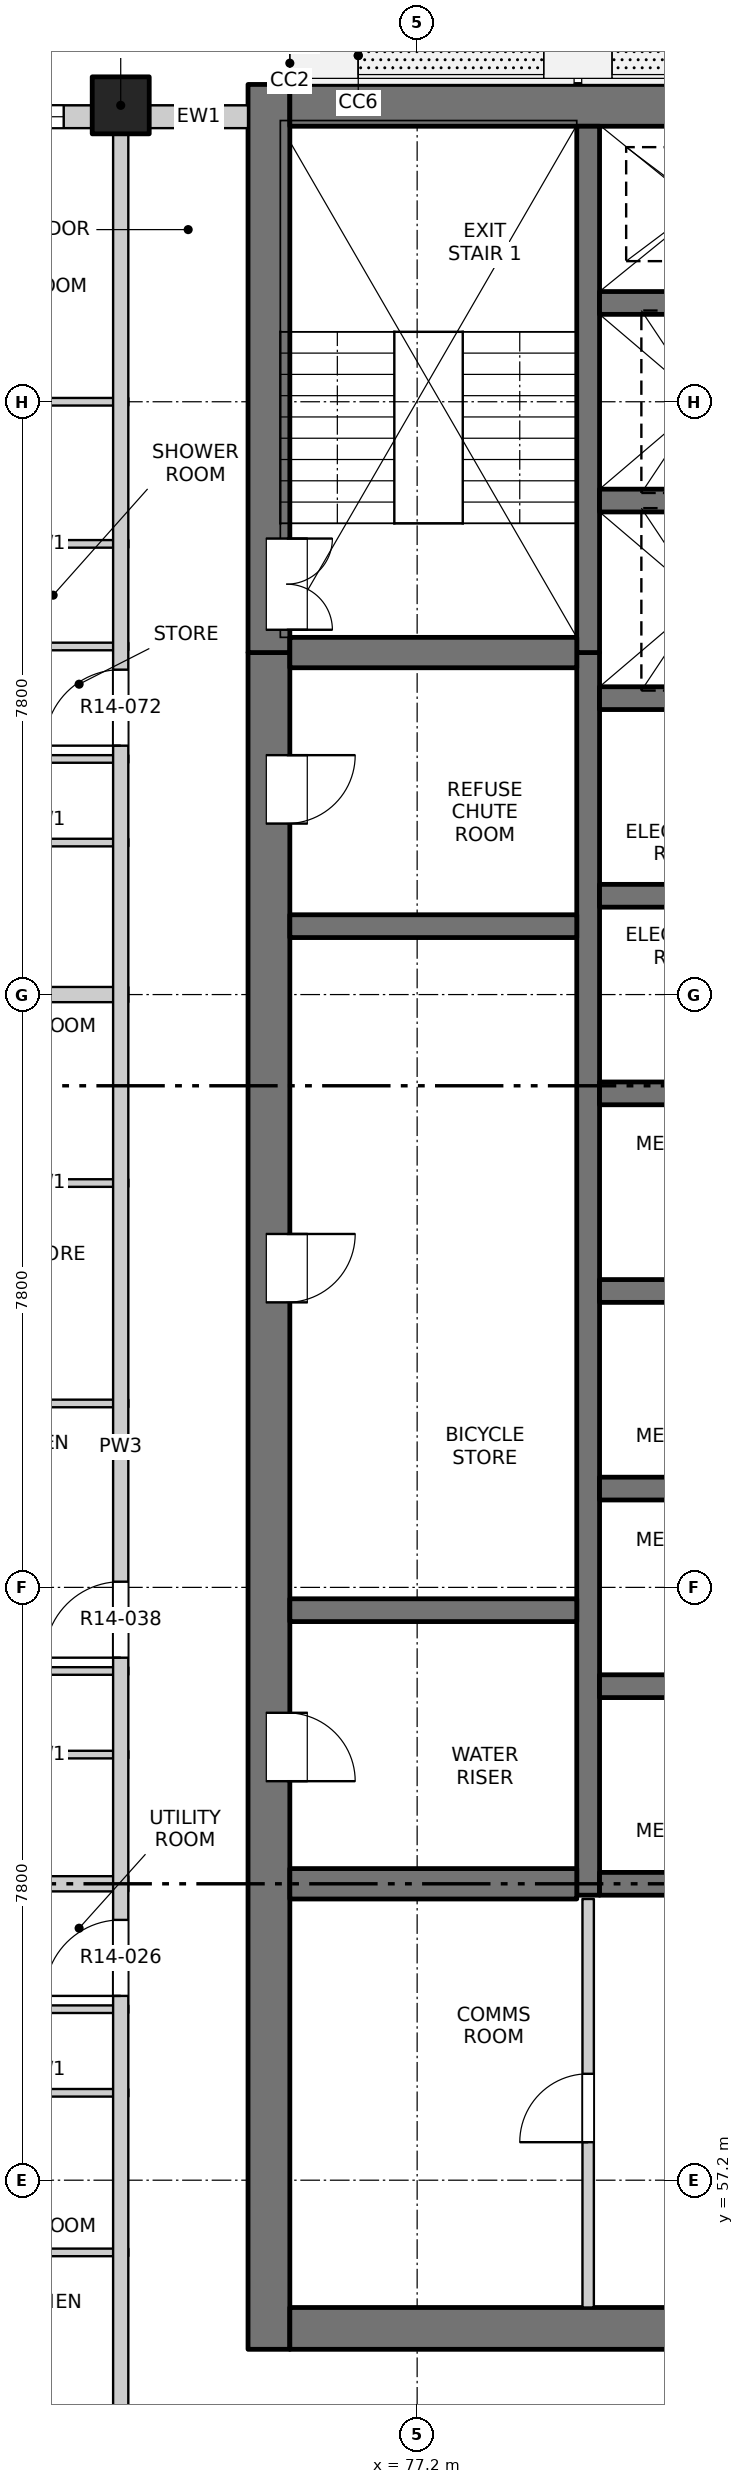
"""IFC4 building model, lengths in metres.
Left out: names, types, materials, properties, quantities, classifications, styles, units other than length and angle.
Written with IfcOpenShell. Run it as: python <this file> out.ifc"""

import sys

from ifc_helpers import new_model, si_unit, direction, frame, frame_2d, origin, origin_2d, place, context, subcontext, project, spatial, rectangle, extrude, element, fill, save


model = new_model("IFC4")
c1 = context("Model", 3, precision=1e-05, world=origin(), true_north=direction((0.0, 1.0)))
c2 = subcontext(c1, "Body", "Model", "MODEL_VIEW")
j1 = project(units=[si_unit("LENGTHUNIT", "METRE"), si_unit("PLANEANGLEUNIT", "RADIAN")], contexts=[c1])
p1 = place(None, origin())
s1 = spatial("IfcSite", under=j1, at=p1, CompositionType="ELEMENT")
p2 = place(p1, origin())
s2 = spatial("IfcBuilding", under=s1, at=p2, CompositionType="ELEMENT")
p3 = place(p2, frame((0.0, 0.0, 155.4)))
s3 = spatial("IfcBuildingStorey", under=s2, at=p3, CompositionType="ELEMENT", Elevation=155.4)
p4 = place(p3, frame((73.3, 84.5, -0.25), z_axis=(0.0, 0.0, 1.0), x_axis=(1.0, 0.0, 0.0)))
e1 = element("IfcColumn", 1, at=p4, inside=s3, PredefinedType="COLUMN", context=c2, shape_type="SweptSolid", body=[
    extrude(rectangle(XDim=0.75, YDim=0.75, at=origin_2d()), origin(), (0.0, 0.0, 1.0), 3.4),
])
p5 = place(p3, frame((75.25, 54.975, -0.25), z_axis=(0.0, 0.0, 1.0), x_axis=(0.0, 1.0, 0.0)))
e2 = element("IfcWall", 2, at=p5, inside=s3, PredefinedType="SOLIDWALL", context=c2, shape_type="SweptSolid", body=[
    extrude(rectangle(XDim=22.325, YDim=0.55, at=frame_2d((11.163, 0.0))), origin(), (0.0, 0.0, 1.0), 3.4),
])
p6 = place(p5, frame((7.475, 0.0, 0.25)))
e3 = element("IfcOpeningElement", 3, at=p6, cuts=e2, PredefinedType="OPENING", context=c2, shape_type="SweptSolid", body=[
    extrude(rectangle(XDim=0.9, YDim=2.1, at=frame_2d((0.45, 1.05))), frame((0.0, 0.285, 0.0), z_axis=(0.0, -1.0, 0.0), x_axis=(1.0, 0.0, 0.0)), (0.0, 0.0, 1.0), 0.57),
])
p7 = place(p5, frame((13.775, 0.0, 0.25)))
e4 = element("IfcOpeningElement", 4, at=p7, cuts=e2, PredefinedType="OPENING", context=c2, shape_type="SweptSolid", body=[
    extrude(rectangle(XDim=0.9, YDim=2.1, at=frame_2d((0.45, 1.05))), frame((0.0, 0.285, 0.0), z_axis=(0.0, -1.0, 0.0), x_axis=(1.0, 0.0, 0.0)), (0.0, 0.0, 1.0), 0.57),
])
p8 = place(p5, frame((20.075, 0.0, 0.25)))
e5 = element("IfcOpeningElement", 5, at=p8, cuts=e2, PredefinedType="OPENING", context=c2, shape_type="SweptSolid", body=[
    extrude(rectangle(XDim=0.9, YDim=2.1, at=frame_2d((0.45, 1.05))), frame((0.0, 0.285, 0.0), z_axis=(0.0, -1.0, 0.0), x_axis=(1.0, 0.0, 0.0)), (0.0, 0.0, 1.0), 0.57),
])
p9 = place(p3, frame((75.25, 77.3, -0.25), z_axis=(0.0, 0.0, 1.0), x_axis=(0.0, 1.0, 0.0)))
e6 = element("IfcWall", 6, at=p9, inside=s3, PredefinedType="SOLIDWALL", context=c2, shape_type="SweptSolid", body=[
    extrude(rectangle(XDim=7.475, YDim=0.55, at=frame_2d((3.737, 0.0))), origin(), (0.0, 0.0, 1.0), 3.4),
])
p10 = place(p9, frame((0.3, 0.0, 0.25)))
e7 = element("IfcOpeningElement", 7, at=p10, cuts=e6, PredefinedType="OPENING", context=c2, shape_type="SweptSolid", body=[
    extrude(rectangle(XDim=1.2, YDim=2.1, at=frame_2d((0.6, 1.05))), frame((0.0, 0.285, 0.0), z_axis=(0.0, -1.0, 0.0), x_axis=(1.0, 0.0, 0.0)), (0.0, 0.0, 1.0), 0.57),
])
p11 = place(p3, frame((75.525, 55.25, -0.25), z_axis=(0.0, 0.0, 1.0), x_axis=(1.0, 0.0, 0.0)))
e8 = element("IfcWall", 8, at=p11, inside=s3, PredefinedType="SOLIDWALL", context=c2, shape_type="SweptSolid", body=[
    extrude(rectangle(XDim=18.95, YDim=0.55, at=frame_2d((9.475, 0.0))), origin(), (0.0, 0.0, 1.0), 3.4),
])
p12 = place(p11, frame((8.725, 0.0, 0.25)))
e9 = element("IfcOpeningElement", 9, at=p12, cuts=e8, PredefinedType="OPENING", context=c2, shape_type="SweptSolid", body=[
    extrude(rectangle(XDim=1.5, YDim=2.1, at=frame_2d((0.75, 1.05))), frame((0.0, 0.285, 0.0), z_axis=(0.0, -1.0, 0.0), x_axis=(1.0, 0.0, 0.0)), (0.0, 0.0, 1.0), 0.57),
])
p13 = place(p3, frame((75.525, 84.5, -0.25), z_axis=(0.0, 0.0, 1.0), x_axis=(1.0, 0.0, 0.0)))
e10 = element("IfcWall", 10, at=p13, inside=s3, PredefinedType="SOLIDWALL", context=c2, shape_type="SweptSolid", body=[
    extrude(rectangle(XDim=18.95, YDim=0.55, at=frame_2d((9.475, 0.0))), origin(), (0.0, 0.0, 1.0), 3.4),
])
p14 = place(p3, frame((79.45, 60.95, -0.25), z_axis=(0.0, 0.0, 1.0), x_axis=(0.0, 1.0, 0.0)))
e11 = element("IfcWall", 11, at=p14, inside=s3, PredefinedType="SOLIDWALL", context=c2, shape_type="SweptSolid", body=[
    extrude(rectangle(XDim=16.35, YDim=0.3, at=frame_2d((8.175, 0.0))), origin(), (0.0, 0.0, 1.0), 3.4),
])
p15 = place(p3, frame((79.45, 77.3, -0.25), z_axis=(0.0, 0.0, 1.0), x_axis=(0.0, 1.0, 0.0)))
e12 = element("IfcWall", 12, at=p15, inside=s3, PredefinedType="SOLIDWALL", context=c2, shape_type="SweptSolid", body=[
    extrude(rectangle(XDim=6.925, YDim=0.3, at=frame_2d((3.462, 0.0))), origin(), (0.0, 0.0, 1.0), 3.4),
])
for number, where, z_axis, x_axis in (
    (13, (79.6, 61.1, -0.25), (0.0, 0.0, 1.0), (1.0, 0.0, 0.0)),
    (14, (79.6, 63.7, -0.25), (0.0, 0.0, 1.0), (1.0, 0.0, 0.0)),
    (15, (79.6, 66.3, -0.25), (0.0, 0.0, 1.0), (1.0, 0.0, 0.0)),
    (16, (79.6, 68.9, -0.25), (0.0, 0.0, 1.0), (1.0, 0.0, 0.0)),
    (17, (79.6, 71.5, -0.25), (0.0, 0.0, 1.0), (1.0, 0.0, 0.0)),
    (18, (79.6, 74.1, -0.25), (0.0, 0.0, 1.0), (1.0, 0.0, 0.0)),
    (19, (79.6, 76.7, -0.25), (0.0, 0.0, 1.0), (1.0, 0.0, 0.0)),
    (20, (79.6, 79.3, -0.25), (0.0, 0.0, 1.0), (1.0, 0.0, 0.0)),
    (21, (79.6, 81.9, -0.25), (0.0, 0.0, 1.0), (1.0, 0.0, 0.0)),
):
    element("IfcWall", number, at=place(p3, frame(where, z_axis=z_axis, x_axis=x_axis)), inside=s3, PredefinedType="SOLIDWALL", context=c2, shape_type="SweptSolid", body=[
        extrude(rectangle(XDim=3.0, YDim=0.3, at=frame_2d((1.5, 0.0))), origin(), (0.0, 0.0, 1.0), 3.4),
    ])
p16 = place(p3, frame((75.525, 61.1, -0.25), z_axis=(0.0, 0.0, 1.0), x_axis=(1.0, 0.0, 0.0)))
e22 = element("IfcWall", 22, at=p16, inside=s3, PredefinedType="SOLIDWALL", context=c2, shape_type="SweptSolid", body=[
    extrude(rectangle(XDim=3.775, YDim=0.4, at=frame_2d((1.888, 0.0))), origin(), (0.0, 0.0, 1.0), 3.4),
])
for number, where, z_axis, x_axis in (
    (23, (75.525, 64.7, -0.25), (0.0, 0.0, 1.0), (1.0, 0.0, 0.0)),
    (24, (75.525, 73.7, -0.25), (0.0, 0.0, 1.0), (1.0, 0.0, 0.0)),
):
    element("IfcWall", number, at=place(p3, frame(where, z_axis=z_axis, x_axis=x_axis)), inside=s3, PredefinedType="SOLIDWALL", context=c2, shape_type="SweptSolid", body=[
        extrude(rectangle(XDim=3.775, YDim=0.3, at=frame_2d((1.888, 0.0))), origin(), (0.0, 0.0, 1.0), 3.4),
    ])
p17 = place(p3, frame((75.525, 77.3, -0.25), z_axis=(0.0, 0.0, 1.0), x_axis=(1.0, 0.0, 0.0)))
e25 = element("IfcWall", 25, at=p17, inside=s3, PredefinedType="SOLIDWALL", context=c2, shape_type="SweptSolid", body=[
    extrude(rectangle(XDim=3.775, YDim=0.4, at=frame_2d((1.888, 0.0))), origin(), (0.0, 0.0, 1.0), 3.4),
])
p18 = place(p3, frame((69.4, 84.35, 0.0), z_axis=(0.0, 0.0, 1.0), x_axis=(1.0, 0.0, 0.0)))
e26 = element("IfcWall", 26, at=p18, inside=s3, PredefinedType="SOLIDWALL", context=c2, shape_type="SweptSolid", body=[
    extrude(rectangle(XDim=3.525, YDim=0.3, at=frame_2d((1.763, 0.0))), origin(), (0.0, 0.0, 1.0), 2.7),
])
p19 = place(p18, frame((0.75, 0.0, 0.9)))
e27 = element("IfcOpeningElement", 27, at=p19, cuts=e26, PredefinedType="OPENING", context=c2, shape_type="SweptSolid", body=[
    extrude(rectangle(XDim=2.4, YDim=1.8, at=frame_2d((1.2, 0.9))), frame((0.0, 0.16, 0.0), z_axis=(0.0, -1.0, 0.0), x_axis=(1.0, 0.0, 0.0)), (0.0, 0.0, 1.0), 0.32),
])
p20 = place(p3, frame((73.675, 84.35, 0.0), z_axis=(0.0, 0.0, 1.0), x_axis=(1.0, 0.0, 0.0)))
e28 = element("IfcWall", 28, at=p20, inside=s3, PredefinedType="SOLIDWALL", context=c2, shape_type="SweptSolid", body=[
    extrude(rectangle(XDim=1.3, YDim=0.3, at=frame_2d((0.65, 0.0))), origin(), (0.0, 0.0, 1.0), 2.7),
])
for number, where, z_axis, x_axis in (
    (29, (71.18, 56.25, 0.0), (0.0, 0.0, 1.0), (1.0, 0.0, 0.0)),
    (30, (71.18, 58.35, 0.0), (0.0, 0.0, 1.0), (1.0, 0.0, 0.0)),
    (31, (71.18, 59.45, 0.0), (0.0, 0.0, 1.0), (1.0, 0.0, 0.0)),
):
    element("IfcWall", number, at=place(p3, frame(where, z_axis=z_axis, x_axis=x_axis)), inside=s3, PredefinedType="PARTITIONING", context=c2, shape_type="SweptSolid", body=[
        extrude(rectangle(XDim=2.22, YDim=0.1, at=frame_2d((1.11, 0.0))), origin(), (0.0, 0.0, 1.0), 3.15),
    ])
p21 = place(p3, frame((65.8, 61.1, 0.0), z_axis=(0.0, 0.0, 1.0), x_axis=(1.0, 0.0, 0.0)))
e32 = element("IfcWall", 32, at=p21, inside=s3, PredefinedType="PARTITIONING", context=c2, shape_type="SweptSolid", body=[
    extrude(rectangle(XDim=7.6, YDim=0.2, at=frame_2d((3.8, 0.0))), origin(), (0.0, 0.0, 1.0), 2.55),
])
for number, where, z_axis, x_axis in (
    (33, (71.18, 62.8, 0.0), (0.0, 0.0, 1.0), (1.0, 0.0, 0.0)),
    (34, (71.18, 63.9, 0.0), (0.0, 0.0, 1.0), (1.0, 0.0, 0.0)),
    (35, (71.18, 67.42, 0.0), (0.0, 0.0, 1.0), (1.0, 0.0, 0.0)),
    (36, (71.18, 70.32, 0.0), (0.0, 0.0, 1.0), (1.0, 0.0, 0.0)),
):
    element("IfcWall", number, at=place(p3, frame(where, z_axis=z_axis, x_axis=x_axis)), inside=s3, PredefinedType="PARTITIONING", context=c2, shape_type="SweptSolid", body=[
        extrude(rectangle(XDim=2.22, YDim=0.1, at=frame_2d((1.11, 0.0))), origin(), (0.0, 0.0, 1.0), 3.15),
    ])
p22 = place(p3, frame((65.8, 72.8, 0.0), z_axis=(0.0, 0.0, 1.0), x_axis=(1.0, 0.0, 0.0)))
e37 = element("IfcWall", 37, at=p22, inside=s3, PredefinedType="PARTITIONING", context=c2, shape_type="SweptSolid", body=[
    extrude(rectangle(XDim=7.6, YDim=0.2, at=frame_2d((3.8, 0.0))), origin(), (0.0, 0.0, 1.0), 3.15),
])
for number, where, z_axis, x_axis in (
    (38, (71.18, 74.8, 0.0), (0.0, 0.0, 1.0), (1.0, 0.0, 0.0)),
    (39, (71.18, 75.9, 0.0), (0.0, 0.0, 1.0), (1.0, 0.0, 0.0)),
    (40, (71.18, 77.38, 0.0), (0.0, 0.0, 1.0), (1.0, 0.0, 0.0)),
    (41, (71.18, 78.73, 0.0), (0.0, 0.0, 1.0), (1.0, 0.0, 0.0)),
):
    element("IfcWall", number, at=place(p3, frame(where, z_axis=z_axis, x_axis=x_axis)), inside=s3, PredefinedType="PARTITIONING", context=c2, shape_type="SweptSolid", body=[
        extrude(rectangle(XDim=2.22, YDim=0.1, at=frame_2d((1.11, 0.0))), origin(), (0.0, 0.0, 1.0), 3.15),
    ])
p23 = place(p3, frame((65.8, 80.6, 0.0), z_axis=(0.0, 0.0, 1.0), x_axis=(1.0, 0.0, 0.0)))
e42 = element("IfcWall", 42, at=p23, inside=s3, PredefinedType="PARTITIONING", context=c2, shape_type="SweptSolid", body=[
    extrude(rectangle(XDim=7.6, YDim=0.1, at=frame_2d((3.8, 0.0))), origin(), (0.0, 0.0, 1.0), 3.15),
])
p24 = place(p23, frame((4.14, 0.0, 0.0)))
e43 = element("IfcOpeningElement", 43, at=p24, cuts=e42, PredefinedType="OPENING", context=c2, shape_type="SweptSolid", body=[
    extrude(rectangle(XDim=0.9, YDim=2.1, at=frame_2d((0.45, 1.05))), frame((0.0, 0.06, 0.0), z_axis=(0.0, -1.0, 0.0), x_axis=(1.0, 0.0, 0.0)), (0.0, 0.0, 1.0), 0.12),
])
p25 = place(p3, frame((73.3, 49.5, 0.0), z_axis=(0.0, 0.0, 1.0), x_axis=(0.0, 1.0, 0.0)))
e44 = element("IfcWall", 44, at=p25, inside=s3, PredefinedType="PARTITIONING", context=c2, shape_type="SweptSolid", body=[
    extrude(rectangle(XDim=34.7, YDim=0.2, at=frame_2d((17.35, 0.0))), origin(), (0.0, 0.0, 1.0), 3.15),
])
p26 = place(p25, frame((10.125, 0.0, 0.0)))
e45 = element("IfcOpeningElement", 45, at=p26, cuts=e44, PredefinedType="OPENING", context=c2, shape_type="SweptSolid", body=[
    extrude(rectangle(XDim=1.0, YDim=2.1, at=frame_2d((0.5, 1.05))), frame((0.0, 0.11, 0.0), z_axis=(0.0, -1.0, 0.0), x_axis=(1.0, 0.0, 0.0)), (0.0, 0.0, 1.0), 0.22),
])
p27 = place(p25, frame((14.575, 0.0, 0.0)))
e46 = element("IfcOpeningElement", 46, at=p27, cuts=e44, PredefinedType="OPENING", context=c2, shape_type="SweptSolid", body=[
    extrude(rectangle(XDim=1.0, YDim=2.1, at=frame_2d((0.5, 1.05))), frame((0.0, 0.11, 0.0), z_axis=(0.0, -1.0, 0.0), x_axis=(1.0, 0.0, 0.0)), (0.0, 0.0, 1.0), 0.22),
])
p28 = place(p25, frame((26.575, 0.0, 0.0)))
e47 = element("IfcOpeningElement", 47, at=p28, cuts=e44, PredefinedType="OPENING", context=c2, shape_type="SweptSolid", body=[
    extrude(rectangle(XDim=1.0, YDim=2.1, at=frame_2d((0.5, 1.05))), frame((0.0, 0.11, 0.0), z_axis=(0.0, -1.0, 0.0), x_axis=(1.0, 0.0, 0.0)), (0.0, 0.0, 1.0), 0.22),
])
p29 = place(p3, frame((79.45, 55.525, 0.0), z_axis=(0.0, 0.0, 1.0), x_axis=(0.0, 1.0, 0.0)))
e48 = element("IfcWall", 48, at=p29, inside=s3, PredefinedType="PARTITIONING", context=c2, shape_type="SweptSolid", body=[
    extrude(rectangle(XDim=5.375, YDim=0.15, at=frame_2d((2.688, 0.0))), origin(), (0.0, 0.0, 1.0), 3.15),
])
p30 = place(p29, frame((2.175, 0.0, 0.0)))
e49 = element("IfcOpeningElement", 49, at=p30, cuts=e48, PredefinedType="OPENING", context=c2, shape_type="SweptSolid", body=[
    extrude(rectangle(XDim=0.9, YDim=2.1, at=frame_2d((0.45, 1.05))), frame((0.0, 0.085, 0.0), z_axis=(0.0, -1.0, 0.0), x_axis=(1.0, 0.0, 0.0)), (0.0, 0.0, 1.0), 0.17),
])
p31 = place(p19, origin())
e50 = element("IfcWindow", 50, at=p31, inside=s3, PartitioningType="DOUBLE_PANEL_VERTICAL", PredefinedType="WINDOW", context=c2, shape_type="SweptSolid", body=[
    extrude(rectangle(XDim=2.4, YDim=1.8, at=frame_2d((1.2, 0.9))), frame((0.0, 0.03, 0.0), z_axis=(0.0, -1.0, 0.0), x_axis=(1.0, 0.0, 0.0)), (0.0, 0.0, 1.0), 0.06),
])
fill(e27, e50)
p32 = place(p30, origin())
e51 = element("IfcDoor", 51, at=p32, inside=s3, OperationType="SINGLE_SWING_LEFT", PredefinedType="DOOR", context=c2, shape_type="SweptSolid", body=[
    extrude(rectangle(XDim=0.9, YDim=2.1, at=frame_2d((0.45, 1.05))), frame((0.0, 0.025, 0.0), z_axis=(0.0, -1.0, 0.0), x_axis=(1.0, 0.0, 0.0)), (0.0, 0.0, 1.0), 0.05),
])
fill(e49, e51)
p33 = place(p26, origin())
e52 = element("IfcDoor", 52, at=p33, inside=s3, OperationType="SINGLE_SWING_RIGHT", PredefinedType="DOOR", context=c2, shape_type="SweptSolid", body=[
    extrude(rectangle(XDim=1.0, YDim=2.1, at=frame_2d((0.5, 1.05))), frame((0.0, 0.025, 0.0), z_axis=(0.0, -1.0, 0.0), x_axis=(1.0, 0.0, 0.0)), (0.0, 0.0, 1.0), 0.05),
])
fill(e45, e52)
p34 = place(p6, origin())
e53 = element("IfcDoor", 53, at=p34, inside=s3, OperationType="SINGLE_SWING_RIGHT", PredefinedType="DOOR", context=c2, shape_type="SweptSolid", body=[
    extrude(rectangle(XDim=0.9, YDim=2.1, at=frame_2d((0.45, 1.05))), frame((0.0, -0.21, 0.0), z_axis=(0.0, -1.0, 0.0), x_axis=(1.0, 0.0, 0.0)), (0.0, 0.0, 1.0), 0.05),
])
fill(e3, e53)
p35 = place(p27, origin())
e54 = element("IfcDoor", 54, at=p35, inside=s3, OperationType="SINGLE_SWING_RIGHT", PredefinedType="DOOR", context=c2, shape_type="SweptSolid", body=[
    extrude(rectangle(XDim=1.0, YDim=2.1, at=frame_2d((0.5, 1.05))), frame((0.0, 0.025, 0.0), z_axis=(0.0, -1.0, 0.0), x_axis=(1.0, 0.0, 0.0)), (0.0, 0.0, 1.0), 0.05),
])
fill(e46, e54)
p36 = place(p7, origin())
e55 = element("IfcDoor", 55, at=p36, inside=s3, OperationType="SINGLE_SWING_LEFT", PredefinedType="DOOR", context=c2, shape_type="SweptSolid", body=[
    extrude(rectangle(XDim=0.9, YDim=2.1, at=frame_2d((0.45, 1.05))), frame((0.0, -0.21, 0.0), z_axis=(0.0, -1.0, 0.0), x_axis=(1.0, 0.0, 0.0)), (0.0, 0.0, 1.0), 0.05),
])
fill(e4, e55)
p37 = place(p8, origin())
e56 = element("IfcDoor", 56, at=p37, inside=s3, OperationType="SINGLE_SWING_LEFT", PredefinedType="DOOR", context=c2, shape_type="SweptSolid", body=[
    extrude(rectangle(XDim=0.9, YDim=2.1, at=frame_2d((0.45, 1.05))), frame((0.0, -0.21, 0.0), z_axis=(0.0, -1.0, 0.0), x_axis=(1.0, 0.0, 0.0)), (0.0, 0.0, 1.0), 0.05),
])
fill(e5, e56)
p38 = place(p28, origin())
e57 = element("IfcDoor", 57, at=p38, inside=s3, OperationType="SINGLE_SWING_RIGHT", PredefinedType="DOOR", context=c2, shape_type="SweptSolid", body=[
    extrude(rectangle(XDim=1.0, YDim=2.1, at=frame_2d((0.5, 1.05))), frame((0.0, 0.025, 0.0), z_axis=(0.0, -1.0, 0.0), x_axis=(1.0, 0.0, 0.0)), (0.0, 0.0, 1.0), 0.05),
])
fill(e47, e57)
p39 = place(p10, origin())
e58 = element("IfcDoor", 58, at=p39, inside=s3, OperationType="DOUBLE_DOOR_SINGLE_SWING", PredefinedType="DOOR", context=c2, shape_type="SweptSolid", body=[
    extrude(rectangle(XDim=1.2, YDim=2.1, at=frame_2d((0.6, 1.05))), frame((0.0, -0.21, 0.0), z_axis=(0.0, -1.0, 0.0), x_axis=(1.0, 0.0, 0.0)), (0.0, 0.0, 1.0), 0.05),
])
fill(e7, e58)
save(model, sys.argv[1])
